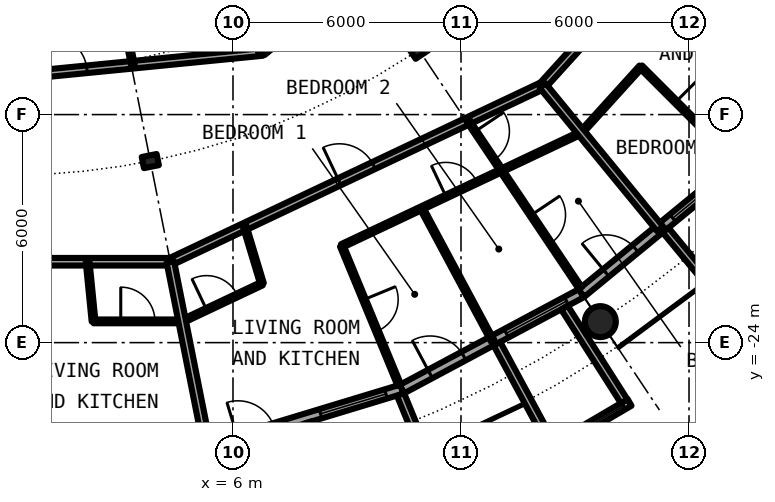
"""IFC4 building model, lengths in metres.
Left out: names, types, materials, properties, quantities, classifications, styles, units other than length and angle.
Written with IfcOpenShell. Run it as: python <this file> out.ifc"""

import sys

from ifc_helpers import new_model, si_unit, direction, frame, frame_2d, origin, origin_2d, place, context, subcontext, project, spatial, rectangle, circle, hollow_circle, i_section, extrude, element, fill, save


model = new_model("IFC4")
c1 = context("Model", 3, precision=1e-05, world=origin(), true_north=direction((0.0, 1.0)))
c2 = subcontext(c1, "Body", "Model", "MODEL_VIEW")
j1 = project(units=[si_unit("LENGTHUNIT", "METRE"), si_unit("PLANEANGLEUNIT", "RADIAN")], contexts=[c1])
p1 = place(None, origin())
s1 = spatial("IfcSite", under=j1, at=p1, CompositionType="ELEMENT")
p2 = place(p1, origin())
s2 = spatial("IfcBuilding", under=s1, at=p2, CompositionType="ELEMENT")
p3 = place(p2, frame((0.0, 0.0, 212.7)))
s3 = spatial("IfcBuildingStorey", under=s2, at=p3, CompositionType="ELEMENT", Elevation=212.7)
p4 = place(p3, frame((15.667, -23.448, 0.0), z_axis=(0.0, 0.0, 1.0), x_axis=(1.0, 0.0, 0.0)))
e1 = element("IfcColumn", 1, at=p4, inside=s3, PredefinedType="COLUMN", context=c2, shape_type="SweptSolid", body=[
    extrude(hollow_circle(Radius=0.406, WallThickness=0.03, at=origin_2d()), origin(), (0.0, 0.0, 1.0), 3.05),
])
for number, where, z_axis, x_axis in (
    (2, (3.824, -19.223, 0.0), (0.0, 0.0, 1.0), (0.195, -0.981, 0.0)),
    (3, (10.889, -16.297, 0.0), (0.0, 0.0, 1.0), (0.556, -0.831, 0.0)),
):
    element("IfcColumn", number, at=place(p3, frame(where, z_axis=z_axis, x_axis=x_axis)), inside=s3, PredefinedType="COLUMN", context=c2, shape_type="SweptSolid", body=[
        extrude(i_section(OverallWidth=0.3, OverallDepth=0.4, WebThickness=0.013, FlangeThickness=0.024, FilletRadius=0.027, at=origin_2d()), origin(), (0.0, 0.0, 1.0), 3.05),
    ])
p5 = place(p3, frame((5.326, -26.775, 0.0), z_axis=(0.0, 0.0, 1.0), x_axis=(0.956965678721, 0.290201119486, 0.0)))
e4 = element("IfcWall", 4, at=p5, inside=s3, PredefinedType="SOLIDWALL", context=c2, shape_type="SweptSolid", body=[
    extrude(rectangle(XDim=5.351, YDim=0.25, at=frame_2d((2.676, 0.0))), origin(), (0.0, 0.0, 1.0), 2.7),
])
p6 = place(p5, frame((0.841, 0.0, 0.0)))
e5 = element("IfcOpeningElement", 5, at=p6, cuts=e4, PredefinedType="OPENING", context=c2, shape_type="SweptSolid", body=[
    extrude(rectangle(XDim=1.0, YDim=2.2, at=frame_2d((0.5, 1.1))), frame((0.0, 0.135, 0.0), z_axis=(0.0, -1.0, 0.0), x_axis=(1.0, 0.0, 0.0)), (0.0, 0.0, 1.0), 0.27),
])
p7 = place(p5, frame((3.111, 0.0, 0.3)))
e6 = element("IfcOpeningElement", 6, at=p7, cuts=e4, PredefinedType="OPENING", context=c2, shape_type="SweptSolid", body=[
    extrude(rectangle(XDim=1.8, YDim=2.1, at=frame_2d((0.9, 1.05))), frame((0.0, 0.135, 0.0), z_axis=(0.0, -1.0, 0.0), x_axis=(1.0, 0.0, 0.0)), (0.0, 0.0, 1.0), 0.27),
])
p8 = place(p3, frame((8.009, -26.092, -0.03), z_axis=(0.0, 0.0, 1.0), x_axis=(0.293406695073, -0.955987715029, 0.0)))
e7 = element("IfcWall", 7, at=p8, inside=s3, PredefinedType="SOLIDWALL", context=c2, shape_type="SweptSolid", body=[
    extrude(rectangle(XDim=3.006, YDim=0.2, at=frame_2d((1.503, 0.0))), origin(), (0.0, 0.0, 1.0), 2.73),
])
p9 = place(p3, frame((10.409, -25.364, -0.03), z_axis=(0.0, 0.0, 1.0), x_axis=(0.379509886562, -0.925187681501, 0.0)))
e8 = element("IfcWall", 8, at=p9, inside=s3, PredefinedType="SOLIDWALL", context=c2, shape_type="SweptSolid", body=[
    extrude(rectangle(XDim=2.883, YDim=0.2, at=frame_2d((1.441, 0.0))), origin(), (0.0, 0.0, 1.0), 2.73),
])
p10 = place(p3, frame((10.447, -25.222, 0.0), z_axis=(0.0, 0.0, 1.0), x_axis=(0.881915646801, 0.471407246368, 0.0)))
e9 = element("IfcWall", 9, at=p10, inside=s3, PredefinedType="SOLIDWALL", context=c2, shape_type="SweptSolid", body=[
    extrude(rectangle(XDim=5.352, YDim=0.25, at=frame_2d((2.676, 0.0))), origin(), (0.0, 0.0, 1.0), 2.7),
])
p11 = place(p10, frame((0.841, 0.0, 0.0)))
e10 = element("IfcOpeningElement", 10, at=p11, cuts=e9, PredefinedType="OPENING", context=c2, shape_type="SweptSolid", body=[
    extrude(rectangle(XDim=1.0, YDim=2.2, at=frame_2d((0.5, 1.1))), frame((0.0, 0.135, 0.0), z_axis=(0.0, -1.0, 0.0), x_axis=(1.0, 0.0, 0.0)), (0.0, 0.0, 1.0), 0.27),
])
p12 = place(p10, frame((3.111, 0.0, 0.3)))
e11 = element("IfcOpeningElement", 11, at=p12, cuts=e9, PredefinedType="OPENING", context=c2, shape_type="SweptSolid", body=[
    extrude(rectangle(XDim=1.8, YDim=2.1, at=frame_2d((0.9, 1.05))), frame((0.0, 0.135, 0.0), z_axis=(0.0, -1.0, 0.0), x_axis=(1.0, 0.0, 0.0)), (0.0, 0.0, 1.0), 0.27),
])
p13 = place(p3, frame((14.327, -26.812, -0.03), z_axis=(0.0, 0.0, 1.0), x_axis=(0.862403467503, 0.506221551535, 0.0)))
e12 = element("IfcWall", 12, at=p13, inside=s3, PredefinedType="SOLIDWALL", context=c2, shape_type="SweptSolid", body=[
    extrude(rectangle(XDim=2.446, YDim=0.2, at=frame_2d((1.223, 0.0))), origin(), (0.0, 0.0, 1.0), 2.73),
])
p14 = place(p13, frame((0.183, 0.0, 0.33)))
e13 = element("IfcOpeningElement", 13, at=p14, cuts=e12, PredefinedType="OPENING", context=c2, shape_type="SweptSolid", body=[
    extrude(circle(Radius=1.04, at=frame_2d((1.04, 1.04))), frame((0.0, 0.11, 0.0), z_axis=(0.0, -1.0, 0.0), x_axis=(1.0, 0.0, 0.0)), (0.0, 0.0, 1.0), 0.22),
])
p15 = place(p3, frame((12.945, -24.029, -0.03), z_axis=(0.0, 0.0, 1.0), x_axis=(0.474424310775, -0.88029629861, 0.0)))
e14 = element("IfcWall", 14, at=p15, inside=s3, PredefinedType="SOLIDWALL", context=c2, shape_type="SweptSolid", body=[
    extrude(rectangle(XDim=3.006, YDim=0.2, at=frame_2d((1.503, 0.0))), origin(), (0.0, 0.0, 1.0), 2.73),
])
p16 = place(p3, frame((14.722, -23.079, -0.03), z_axis=(0.0, 0.0, 1.0), x_axis=(0.537572179146, -0.843217737129, 0.0)))
e15 = element("IfcWall", 15, at=p16, inside=s3, PredefinedType="SOLIDWALL", context=c2, shape_type="SweptSolid", body=[
    extrude(rectangle(XDim=2.924, YDim=0.2, at=frame_2d((1.462, 0.0))), origin(), (0.0, 0.0, 1.0), 2.73),
])
p17 = place(p3, frame((15.167, -22.699, 0.0), z_axis=(0.0, 0.0, 1.0), x_axis=(0.773019449054, 0.634382322723, 0.0)))
e16 = element("IfcWall", 16, at=p17, inside=s3, PredefinedType="SOLIDWALL", context=c2, shape_type="SweptSolid", body=[
    extrude(rectangle(XDim=5.352, YDim=0.25, at=frame_2d((2.676, 0.0))), origin(), (0.0, 0.0, 1.0), 2.7),
])
p18 = place(p17, frame((0.841, 0.0, 0.0)))
e17 = element("IfcOpeningElement", 17, at=p18, cuts=e16, PredefinedType="OPENING", context=c2, shape_type="SweptSolid", body=[
    extrude(rectangle(XDim=1.0, YDim=2.2, at=frame_2d((0.5, 1.1))), frame((0.0, 0.135, 0.0), z_axis=(0.0, -1.0, 0.0), x_axis=(1.0, 0.0, 0.0)), (0.0, 0.0, 1.0), 0.27),
])
p19 = place(p17, frame((3.111, 0.0, 0.3)))
e18 = element("IfcOpeningElement", 18, at=p19, cuts=e16, PredefinedType="OPENING", context=c2, shape_type="SweptSolid", body=[
    extrude(rectangle(XDim=1.8, YDim=2.1, at=frame_2d((0.9, 1.05))), frame((0.0, 0.135, 0.0), z_axis=(0.0, -1.0, 0.0), x_axis=(1.0, 0.0, 0.0)), (0.0, 0.0, 1.0), 0.27),
])
p20 = place(p3, frame((17.384, -21.041, -0.03), z_axis=(0.0, 0.0, 1.0), x_axis=(0.63709551667, -0.770784861449, 0.0)))
e19 = element("IfcWall", 19, at=p20, inside=s3, PredefinedType="SOLIDWALL", context=c2, shape_type="SweptSolid", body=[
    extrude(rectangle(XDim=3.006, YDim=0.2, at=frame_2d((1.503, 0.0))), origin(), (0.0, 0.0, 1.0), 2.73),
])
p21 = place(p3, frame((15.162, -18.475, 0.0), z_axis=(0.0, 0.0, 1.0), x_axis=(0.671528384412, 0.740978831634, 0.0)))
e20 = element("IfcWall", 20, at=p21, inside=s3, PredefinedType="PARTITIONING", context=c2, shape_type="SweptSolid", body=[
    extrude(rectangle(XDim=2.338, YDim=0.1, at=frame_2d((1.169, 0.0))), origin(), (0.0, 0.0, 1.0), 2.7),
])
p22 = place(p3, frame((2.331, -23.441, 0.0), z_axis=(0.0, 0.0, 1.0), x_axis=(1.0, 0.0, 0.0)))
e21 = element("IfcWall", 21, at=p22, inside=s3, PredefinedType="PARTITIONING", context=c2, shape_type="SweptSolid", body=[
    extrude(rectangle(XDim=2.332, YDim=0.1, at=frame_2d((1.166, 0.0))), origin(), (0.0, 0.0, 1.0), 2.7),
])
p23 = place(p22, frame((0.716, 0.0, 0.0)))
e22 = element("IfcOpeningElement", 22, at=p23, cuts=e21, PredefinedType="OPENING", context=c2, shape_type="SweptSolid", body=[
    extrude(rectangle(XDim=0.9, YDim=2.3, at=frame_2d((0.45, 1.15))), frame((0.0, 0.06, 0.0), z_axis=(0.0, -1.0, 0.0), x_axis=(1.0, 0.0, 0.0)), (0.0, 0.0, 1.0), 0.12),
])
p24 = place(p3, frame((4.663, -23.441, 0.0), z_axis=(0.0, 0.0, 1.0), x_axis=(0.904028696625, 0.427471771791, 0.0)))
e23 = element("IfcWall", 23, at=p24, inside=s3, PredefinedType="PARTITIONING", context=c2, shape_type="SweptSolid", body=[
    extrude(rectangle(XDim=2.323, YDim=0.1, at=frame_2d((1.161, 0.0))), origin(), (0.0, 0.0, 1.0), 2.7),
])
p25 = place(p24, frame((0.711, 0.0, 0.0)))
e24 = element("IfcOpeningElement", 24, at=p25, cuts=e23, PredefinedType="OPENING", context=c2, shape_type="SweptSolid", body=[
    extrude(rectangle(XDim=0.9, YDim=2.3, at=frame_2d((0.45, 1.15))), frame((0.0, 0.06, 0.0), z_axis=(0.0, -1.0, 0.0), x_axis=(1.0, 0.0, 0.0)), (0.0, 0.0, 1.0), 0.12),
])
p26 = place(p3, frame((8.863, -21.455, 0.0), z_axis=(0.0, 0.0, 1.0), x_axis=(0.904027961542, 0.427473326361, 0.0)))
e25 = element("IfcWall", 25, at=p26, inside=s3, PredefinedType="PARTITIONING", context=c2, shape_type="SweptSolid", body=[
    extrude(rectangle(XDim=6.969, YDim=0.1, at=frame_2d((3.484, 0.0))), origin(), (0.0, 0.0, 1.0), 2.7),
])
p27 = place(p26, frame((3.034, 0.0, 0.0)))
e26 = element("IfcOpeningElement", 26, at=p27, cuts=e25, PredefinedType="OPENING", context=c2, shape_type="SweptSolid", body=[
    extrude(rectangle(XDim=0.9, YDim=2.3, at=frame_2d((0.45, 1.15))), frame((0.0, 0.06, 0.0), z_axis=(0.0, -1.0, 0.0), x_axis=(1.0, 0.0, 0.0)), (0.0, 0.0, 1.0), 0.12),
])
p28 = place(p3, frame((14.147, -17.238, 0.0), z_axis=(0.0, 0.0, 1.0), x_axis=(0.671561669125, 0.740948665268, 0.0)))
e27 = element("IfcWall", 27, at=p28, inside=s3, PredefinedType="PARTITIONING", context=c2, shape_type="SweptSolid", body=[
    extrude(rectangle(XDim=6.544, YDim=0.2, at=frame_2d((3.272, 0.0))), origin(), (0.0, 0.0, 1.0), 2.7),
])
p29 = place(p28, frame((1.682, 0.0, 0.0)))
e28 = element("IfcOpeningElement", 28, at=p29, cuts=e27, PredefinedType="OPENING", context=c2, shape_type="SweptSolid", body=[
    extrude(rectangle(XDim=1.0, YDim=2.3, at=frame_2d((0.5, 1.15))), frame((0.0, 0.11, 0.0), z_axis=(0.0, -1.0, 0.0), x_axis=(1.0, 0.0, 0.0)), (0.0, 0.0, 1.0), 0.22),
])
p30 = place(p3, frame((-4.351, -21.872, 0.0), z_axis=(0.0, 0.0, 1.0), x_axis=(1.0, 0.0, 0.0)))
e29 = element("IfcWall", 29, at=p30, inside=s3, PredefinedType="PARTITIONING", context=c2, shape_type="SweptSolid", body=[
    extrude(rectangle(XDim=8.702, YDim=0.2, at=frame_2d((4.351, 0.0))), origin(), (0.0, 0.0, 1.0), 2.7),
])
p31 = place(p30, frame((2.763, 0.0, 0.0)))
e30 = element("IfcOpeningElement", 30, at=p31, cuts=e29, PredefinedType="OPENING", context=c2, shape_type="SweptSolid", body=[
    extrude(rectangle(XDim=1.0, YDim=2.3, at=frame_2d((0.5, 1.15))), frame((0.0, 0.11, 0.0), z_axis=(0.0, -1.0, 0.0), x_axis=(1.0, 0.0, 0.0)), (0.0, 0.0, 1.0), 0.22),
])
p32 = place(p3, frame((4.352, -21.873, 0.0), z_axis=(0.0, 0.0, 1.0), x_axis=(0.903903349022, 0.427736759733, 0.0)))
e31 = element("IfcWall", 31, at=p32, inside=s3, PredefinedType="PARTITIONING", context=c2, shape_type="SweptSolid", body=[
    extrude(rectangle(XDim=10.838, YDim=0.2, at=frame_2d((5.419, 0.0))), origin(), (0.0, 0.0, 1.0), 2.7),
])
p33 = place(p32, frame((4.92, 0.0, 0.0)))
e32 = element("IfcOpeningElement", 32, at=p33, cuts=e31, PredefinedType="OPENING", context=c2, shape_type="SweptSolid", body=[
    extrude(rectangle(XDim=1.0, YDim=2.3, at=frame_2d((0.5, 1.15))), frame((0.0, 0.11, 0.0), z_axis=(0.0, -1.0, 0.0), x_axis=(1.0, 0.0, 0.0)), (0.0, 0.0, 1.0), 0.22),
])
p34 = place(p3, frame((-3.454, -17.36, 0.0), z_axis=(0.0, 0.0, 1.0), x_axis=(0.995189328429, 0.097970406658, 0.0)))
e33 = element("IfcWall", 33, at=p34, inside=s3, PredefinedType="PARTITIONING", context=c2, shape_type="SweptSolid", body=[
    extrude(rectangle(XDim=10.28, YDim=0.2, at=frame_2d((5.14, 0.0))), origin(), (0.0, 0.0, 1.0), 2.7),
])
p35 = place(p34, frame((4.639, 0.0, 0.0)))
e34 = element("IfcOpeningElement", 34, at=p35, cuts=e33, PredefinedType="OPENING", context=c2, shape_type="SweptSolid", body=[
    extrude(rectangle(XDim=1.0, YDim=2.3, at=frame_2d((0.5, 1.15))), frame((0.0, 0.11, 0.0), z_axis=(0.0, -1.0, 0.0), x_axis=(1.0, 0.0, 0.0)), (0.0, 0.0, 1.0), 0.22),
])
p36 = place(p3, frame((6.773, -16.353, 0.0), z_axis=(0.0, 0.0, 1.0), x_axis=(0.773034536097, 0.634363938131, 0.0)))
e35 = element("IfcWall", 35, at=p36, inside=s3, PredefinedType="PARTITIONING", context=c2, shape_type="SweptSolid", body=[
    extrude(rectangle(XDim=10.277, YDim=0.2, at=frame_2d((5.138, 0.0))), origin(), (0.0, 0.0, 1.0), 2.7),
])
p37 = place(p36, frame((4.638, 0.0, 0.0)))
e36 = element("IfcOpeningElement", 36, at=p37, cuts=e35, PredefinedType="OPENING", context=c2, shape_type="SweptSolid", body=[
    extrude(rectangle(XDim=1.0, YDim=2.3, at=frame_2d((0.5, 1.15))), frame((0.0, 0.11, 0.0), z_axis=(0.0, -1.0, 0.0), x_axis=(1.0, 0.0, 0.0)), (0.0, 0.0, 1.0), 0.22),
])
p38 = place(p3, frame((2.175, -21.872, 0.0), z_axis=(0.0, 0.0, 1.0), x_axis=(0.098951748623, -0.995092232632, 0.0)))
e37 = element("IfcWall", 37, at=p38, inside=s3, PredefinedType="PARTITIONING", context=c2, shape_type="SweptSolid", body=[
    extrude(rectangle(XDim=1.577, YDim=0.1, at=frame_2d((0.788, 0.0))), origin(), (0.0, 0.0, 1.0), 2.7),
])
p39 = place(p3, frame((2.511, -12.454, 0.0), z_axis=(0.0, 0.0, 1.0), x_axis=(0.197724661373, -0.980257597923, 0.0)))
e38 = element("IfcWall", 38, at=p39, inside=s3, PredefinedType="PARTITIONING", context=c2, shape_type="SweptSolid", body=[
    extrude(rectangle(XDim=4.319, YDim=0.1, at=frame_2d((2.16, 0.0))), origin(), (0.0, 0.0, 1.0), 2.7),
])
p40 = place(p39, frame((1.71, 0.0, 0.0)))
e39 = element("IfcOpeningElement", 39, at=p40, cuts=e38, PredefinedType="OPENING", context=c2, shape_type="SweptSolid", body=[
    extrude(rectangle(XDim=0.9, YDim=2.3, at=frame_2d((0.45, 1.15))), frame((0.0, 0.06, 0.0), z_axis=(0.0, -1.0, 0.0), x_axis=(1.0, 0.0, 0.0)), (0.0, 0.0, 1.0), 0.12),
])
p41 = place(p3, frame((2.952, -7.133, 0.0), z_axis=(0.0, 0.0, 1.0), x_axis=(0.382570007985, -0.923926506271, 0.0)))
e40 = element("IfcWall", 40, at=p41, inside=s3, PredefinedType="PARTITIONING", context=c2, shape_type="SweptSolid", body=[
    extrude(rectangle(XDim=9.98, YDim=0.2, at=frame_2d((4.99, 0.0))), origin(), (0.0, 0.0, 1.0), 2.7),
])
p42 = place(p3, frame((4.351, -21.872, 0.0), z_axis=(0.0, 0.0, 1.0), x_axis=(0.195075825861, -0.980788163756, 0.0)))
e41 = element("IfcWall", 41, at=p42, inside=s3, PredefinedType="PARTITIONING", context=c2, shape_type="SweptSolid", body=[
    extrude(rectangle(XDim=4.875, YDim=0.2, at=frame_2d((2.438, 0.0))), origin(), (0.0, 0.0, 1.0), 2.7),
])
p43 = place(p3, frame((6.31, -20.945, 0.0), z_axis=(0.0, 0.0, 1.0), x_axis=(0.288517752304, -0.957474546192, 0.0)))
e42 = element("IfcWall", 42, at=p43, inside=s3, PredefinedType="PARTITIONING", context=c2, shape_type="SweptSolid", body=[
    extrude(rectangle(XDim=1.57, YDim=0.1, at=frame_2d((0.785, 0.0))), origin(), (0.0, 0.0, 1.0), 2.7),
])
p44 = place(p3, frame((8.862, -21.454, 0.0), z_axis=(0.0, 0.0, 1.0), x_axis=(0.381852842178, -0.924223136975, 0.0)))
e43 = element("IfcWall", 43, at=p44, inside=s3, PredefinedType="PARTITIONING", context=c2, shape_type="SweptSolid", body=[
    extrude(rectangle(XDim=3.962, YDim=0.1, at=frame_2d((1.981, 0.0))), origin(), (0.0, 0.0, 1.0), 2.7),
])
p45 = place(p44, frame((1.531, 0.0, 0.0)))
e44 = element("IfcOpeningElement", 44, at=p45, cuts=e43, PredefinedType="OPENING", context=c2, shape_type="SweptSolid", body=[
    extrude(rectangle(XDim=0.9, YDim=2.3, at=frame_2d((0.45, 1.15))), frame((0.0, 0.06, 0.0), z_axis=(0.0, -1.0, 0.0), x_axis=(1.0, 0.0, 0.0)), (0.0, 0.0, 1.0), 0.12),
])
p46 = place(p3, frame((10.962, -20.461, 0.0), z_axis=(0.0, 0.0, 1.0), x_axis=(0.472173540979, -0.881505613822, 0.0)))
e45 = element("IfcWall", 45, at=p46, inside=s3, PredefinedType="PARTITIONING", context=c2, shape_type="SweptSolid", body=[
    extrude(rectangle(XDim=3.963, YDim=0.1, at=frame_2d((1.981, 0.0))), origin(), (0.0, 0.0, 1.0), 2.7),
])
p47 = place(p3, frame((12.188, -18.165, 0.0), z_axis=(0.0, 0.0, 1.0), x_axis=(0.557206464517, -0.830373985564, 0.0)))
e46 = element("IfcWall", 46, at=p47, inside=s3, PredefinedType="PARTITIONING", context=c2, shape_type="SweptSolid", body=[
    extrude(rectangle(XDim=5.3, YDim=0.1, at=frame_2d((2.65, 0.0))), origin(), (0.0, 0.0, 1.0), 2.7),
])
p48 = place(p47, frame((0.334, 0.0, 0.0)))
e47 = element("IfcOpeningElement", 47, at=p48, cuts=e46, PredefinedType="OPENING", context=c2, shape_type="SweptSolid", body=[
    extrude(rectangle(XDim=0.9, YDim=2.3, at=frame_2d((0.45, 1.15))), frame((0.0, 0.06, 0.0), z_axis=(0.0, -1.0, 0.0), x_axis=(1.0, 0.0, 0.0)), (0.0, 0.0, 1.0), 0.12),
])
p49 = place(p47, frame((2.984, 0.0, 0.0)))
e48 = element("IfcOpeningElement", 48, at=p49, cuts=e46, PredefinedType="OPENING", context=c2, shape_type="SweptSolid", body=[
    extrude(rectangle(XDim=0.9, YDim=2.3, at=frame_2d((0.45, 1.15))), frame((0.0, 0.06, 0.0), z_axis=(0.0, -1.0, 0.0), x_axis=(1.0, 0.0, 0.0)), (0.0, 0.0, 1.0), 0.12),
])
p50 = place(p3, frame((14.147, -17.238, 0.0), z_axis=(0.0, 0.0, 1.0), x_axis=(0.634374159378, -0.773026148273, 0.0)))
e49 = element("IfcWall", 49, at=p50, inside=s3, PredefinedType="PARTITIONING", context=c2, shape_type="SweptSolid", body=[
    extrude(rectangle(XDim=4.876, YDim=0.2, at=frame_2d((2.438, 0.0))), origin(), (0.0, 0.0, 1.0), 2.7),
])
p51 = place(p3, frame((16.732, -16.743, 0.0), z_axis=(0.0, 0.0, 1.0), x_axis=(0.706967463531, -0.707246071398, 0.0)))
e50 = element("IfcWall", 50, at=p51, inside=s3, PredefinedType="PARTITIONING", context=c2, shape_type="SweptSolid", body=[
    extrude(rectangle(XDim=3.505, YDim=0.1, at=frame_2d((1.752, 0.0))), origin(), (0.0, 0.0, 1.0), 2.7),
])
p52 = place(p51, frame((1.303, 0.0, 0.0)))
e51 = element("IfcOpeningElement", 51, at=p52, cuts=e50, PredefinedType="OPENING", context=c2, shape_type="SweptSolid", body=[
    extrude(rectangle(XDim=0.9, YDim=2.3, at=frame_2d((0.45, 1.15))), frame((0.0, 0.06, 0.0), z_axis=(0.0, -1.0, 0.0), x_axis=(1.0, 0.0, 0.0)), (0.0, 0.0, 1.0), 0.12),
])
p53 = place(p7, origin())
e52 = element("IfcWindow", 52, at=p53, inside=s3, PartitioningType="SINGLE_PANEL", PredefinedType="WINDOW", context=c2, shape_type="SweptSolid", body=[
    extrude(rectangle(XDim=1.8, YDim=2.1, at=frame_2d((0.9, 1.05))), frame((0.0, 0.03, 0.0), z_axis=(0.0, -1.0, 0.0), x_axis=(1.0, 0.0, 0.0)), (0.0, 0.0, 1.0), 0.06),
])
fill(e6, e52)
p54 = place(p11, origin())
e53 = element("IfcDoor", 53, at=p54, inside=s3, OperationType="SINGLE_SWING_LEFT", PredefinedType="DOOR", context=c2, shape_type="SweptSolid", body=[
    extrude(rectangle(XDim=1.0, YDim=2.2, at=frame_2d((0.5, 1.1))), frame((0.0, 0.025, 0.0), z_axis=(0.0, -1.0, 0.0), x_axis=(1.0, 0.0, 0.0)), (0.0, 0.0, 1.0), 0.05),
])
fill(e10, e53)
p55 = place(p12, origin())
e54 = element("IfcWindow", 54, at=p55, inside=s3, PartitioningType="SINGLE_PANEL", PredefinedType="WINDOW", context=c2, shape_type="SweptSolid", body=[
    extrude(rectangle(XDim=1.8, YDim=2.1, at=frame_2d((0.9, 1.05))), frame((0.0, 0.03, 0.0), z_axis=(0.0, -1.0, 0.0), x_axis=(1.0, 0.0, 0.0)), (0.0, 0.0, 1.0), 0.06),
])
fill(e11, e54)
p56 = place(p14, origin())
e55 = element("IfcWindow", 55, at=p56, inside=s3, PartitioningType="SINGLE_PANEL", PredefinedType="WINDOW", context=c2, shape_type="SweptSolid", body=[
    extrude(circle(Radius=1.04, at=frame_2d((1.04, 1.04))), frame((0.0, 0.03, 0.0), z_axis=(0.0, -1.0, 0.0), x_axis=(1.0, 0.0, 0.0)), (0.0, 0.0, 1.0), 0.06),
])
fill(e13, e55)
p57 = place(p18, origin())
e56 = element("IfcDoor", 56, at=p57, inside=s3, OperationType="SINGLE_SWING_LEFT", PredefinedType="DOOR", context=c2, shape_type="SweptSolid", body=[
    extrude(rectangle(XDim=1.0, YDim=2.2, at=frame_2d((0.5, 1.1))), frame((0.0, 0.025, 0.0), z_axis=(0.0, -1.0, 0.0), x_axis=(1.0, 0.0, 0.0)), (0.0, 0.0, 1.0), 0.05),
])
fill(e17, e56)
p58 = place(p19, origin())
e57 = element("IfcWindow", 57, at=p58, inside=s3, PartitioningType="SINGLE_PANEL", PredefinedType="WINDOW", context=c2, shape_type="SweptSolid", body=[
    extrude(rectangle(XDim=1.8, YDim=2.1, at=frame_2d((0.9, 1.05))), frame((0.0, 0.03, 0.0), z_axis=(0.0, -1.0, 0.0), x_axis=(1.0, 0.0, 0.0)), (0.0, 0.0, 1.0), 0.06),
])
fill(e18, e57)
p59 = place(p23, origin())
e58 = element("IfcDoor", 58, at=p59, inside=s3, OperationType="SINGLE_SWING_LEFT", PredefinedType="DOOR", context=c2, shape_type="SweptSolid", body=[
    extrude(rectangle(XDim=0.9, YDim=2.3, at=frame_2d((0.45, 1.15))), frame((0.0, 0.025, 0.0), z_axis=(0.0, -1.0, 0.0), x_axis=(1.0, 0.0, 0.0)), (0.0, 0.0, 1.0), 0.05),
])
fill(e22, e58)
p60 = place(p33, origin())
e59 = element("IfcDoor", 59, at=p60, inside=s3, OperationType="SINGLE_SWING_RIGHT", PredefinedType="DOOR", context=c2, shape_type="SweptSolid", body=[
    extrude(rectangle(XDim=1.0, YDim=2.3, at=frame_2d((0.5, 1.15))), frame((0.0, 0.025, 0.0), z_axis=(0.0, -1.0, 0.0), x_axis=(1.0, 0.0, 0.0)), (0.0, 0.0, 1.0), 0.05),
])
fill(e32, e59)
p61 = place(p25, origin())
e60 = element("IfcDoor", 60, at=p61, inside=s3, OperationType="SINGLE_SWING_LEFT", PredefinedType="DOOR", context=c2, shape_type="SweptSolid", body=[
    extrude(rectangle(XDim=0.9, YDim=2.3, at=frame_2d((0.45, 1.15))), frame((0.0, 0.025, 0.0), z_axis=(0.0, -1.0, 0.0), x_axis=(1.0, 0.0, 0.0)), (0.0, 0.0, 1.0), 0.05),
])
fill(e24, e60)
p62 = place(p48, origin())
e61 = element("IfcDoor", 61, at=p62, inside=s3, OperationType="SINGLE_SWING_LEFT", PredefinedType="DOOR", context=c2, shape_type="SweptSolid", body=[
    extrude(rectangle(XDim=0.9, YDim=2.3, at=frame_2d((0.45, 1.15))), frame((0.0, 0.025, 0.0), z_axis=(0.0, -1.0, 0.0), x_axis=(1.0, 0.0, 0.0)), (0.0, 0.0, 1.0), 0.05),
])
fill(e47, e61)
p63 = place(p45, origin())
e62 = element("IfcDoor", 62, at=p63, inside=s3, OperationType="SINGLE_SWING_LEFT", PredefinedType="DOOR", context=c2, shape_type="SweptSolid", body=[
    extrude(rectangle(XDim=0.9, YDim=2.3, at=frame_2d((0.45, 1.15))), frame((0.0, 0.025, 0.0), z_axis=(0.0, -1.0, 0.0), x_axis=(1.0, 0.0, 0.0)), (0.0, 0.0, 1.0), 0.05),
])
fill(e44, e62)
p64 = place(p27, origin())
e63 = element("IfcDoor", 63, at=p64, inside=s3, OperationType="SINGLE_SWING_LEFT", PredefinedType="DOOR", context=c2, shape_type="SweptSolid", body=[
    extrude(rectangle(XDim=0.9, YDim=2.3, at=frame_2d((0.45, 1.15))), frame((0.0, 0.025, 0.0), z_axis=(0.0, -1.0, 0.0), x_axis=(1.0, 0.0, 0.0)), (0.0, 0.0, 1.0), 0.05),
])
fill(e26, e63)
p65 = place(p49, origin())
e64 = element("IfcDoor", 64, at=p65, inside=s3, OperationType="SINGLE_SWING_RIGHT", PredefinedType="DOOR", context=c2, shape_type="SweptSolid", body=[
    extrude(rectangle(XDim=0.9, YDim=2.3, at=frame_2d((0.45, 1.15))), frame((0.0, 0.025, 0.0), z_axis=(0.0, -1.0, 0.0), x_axis=(1.0, 0.0, 0.0)), (0.0, 0.0, 1.0), 0.05),
])
fill(e48, e64)
p66 = place(p52, origin())
e65 = element("IfcDoor", 65, at=p66, inside=s3, OperationType="SINGLE_SWING_LEFT", PredefinedType="DOOR", context=c2, shape_type="SweptSolid", body=[
    extrude(rectangle(XDim=0.9, YDim=2.3, at=frame_2d((0.45, 1.15))), frame((0.0, 0.025, 0.0), z_axis=(0.0, -1.0, 0.0), x_axis=(1.0, 0.0, 0.0)), (0.0, 0.0, 1.0), 0.05),
])
fill(e51, e65)
p67 = place(p35, origin())
e66 = element("IfcDoor", 66, at=p67, inside=s3, OperationType="SINGLE_SWING_LEFT", PredefinedType="DOOR", context=c2, shape_type="SweptSolid", body=[
    extrude(rectangle(XDim=1.0, YDim=2.3, at=frame_2d((0.5, 1.15))), frame((0.0, 0.025, 0.0), z_axis=(0.0, -1.0, 0.0), x_axis=(1.0, 0.0, 0.0)), (0.0, 0.0, 1.0), 0.05),
])
fill(e34, e66)
save(model, sys.argv[1])
